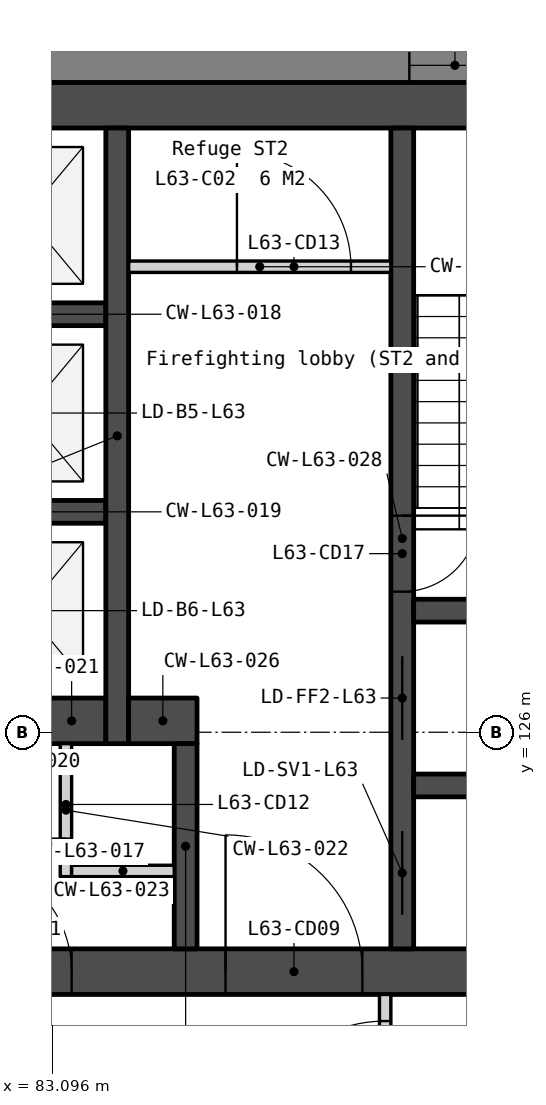
"""IFC4 building model, lengths in metres.
Left out: names, types, materials, properties, quantities, classifications, styles, units other than length and angle.
Written with IfcOpenShell. Run it as: python <this file> out.ifc"""

import sys

from ifc_helpers import new_model, si_unit, direction, frame, frame_2d, origin, place, context, subcontext, project, spatial, polyline, rectangle, outline, extrude, element, fill, save


model = new_model("IFC4")
c1 = context("Model", 3, precision=1e-05, world=origin(), true_north=direction((0.0, 1.0)))
c2 = subcontext(c1, "Body", "Model", "MODEL_VIEW")
j1 = project(units=[si_unit("LENGTHUNIT", "METRE"), si_unit("PLANEANGLEUNIT", "RADIAN")], contexts=[c1])
p1 = place(None, origin())
s1 = spatial("IfcSite", under=j1, at=p1, CompositionType="ELEMENT")
p2 = place(p1, origin())
s2 = spatial("IfcBuilding", under=s1, at=p2, CompositionType="ELEMENT")
p3 = place(p2, frame((0.0, 0.0, 258.2)))
s3 = spatial("IfcBuildingStorey", under=s2, at=p3, CompositionType="ELEMENT", Elevation=258.2)
p4 = place(p3, frame((69.0, 134.25, 0.0), z_axis=(0.0, 0.0, 1.0), x_axis=(1.0, 0.0, 0.0)))
e1 = element("IfcWall", 1, at=p4, inside=s3, PredefinedType="SOLIDWALL", context=c2, shape_type="SweptSolid", body=[
    extrude(rectangle(XDim=22.0, YDim=0.6, at=frame_2d((11.0, 0.0))), origin(), (0.0, 0.0, 1.0), 3.75),
])
p5 = place(p3, frame((69.0, 122.85, 0.0), z_axis=(0.0, 0.0, 1.0), x_axis=(1.0, 0.0, 0.0)))
e2 = element("IfcWall", 2, at=p5, inside=s3, PredefinedType="SOLIDWALL", context=c2, shape_type="SweptSolid", body=[
    extrude(rectangle(XDim=22.0, YDim=0.6, at=frame_2d((11.0, 0.0))), origin(), (0.0, 0.0, 1.0), 3.75),
])
p6 = place(p5, frame((16.375, 0.0, 0.0)))
e3 = element("IfcOpeningElement", 3, at=p6, cuts=e2, PredefinedType="OPENING", context=c2, shape_type="SweptSolid", body=[
    extrude(rectangle(XDim=1.8, YDim=2.1, at=frame_2d((0.9, 1.05))), frame((0.0, 0.31, 0.0), z_axis=(0.0, -1.0, 0.0), x_axis=(1.0, 0.0, 0.0)), (0.0, 0.0, 1.0), 0.62),
])
p7 = place(p5, frame((3.825, 0.0, 0.0)))
e4 = element("IfcOpeningElement", 4, at=p7, cuts=e2, PredefinedType="OPENING", context=c2, shape_type="SweptSolid", body=[
    extrude(rectangle(XDim=1.8, YDim=2.1, at=frame_2d((0.9, 1.05))), frame((0.0, 0.31, 0.0), z_axis=(0.0, -1.0, 0.0), x_axis=(1.0, 0.0, 0.0)), (0.0, 0.0, 1.0), 0.62),
])
p8 = place(p5, frame((12.85, 0.0, 0.0)))
e5 = element("IfcOpeningElement", 5, at=p8, cuts=e2, PredefinedType="OPENING", context=c2, shape_type="SweptSolid", body=[
    extrude(rectangle(XDim=1.5, YDim=2.1, at=frame_2d((0.75, 1.05))), frame((0.0, 0.31, 0.0), z_axis=(0.0, -1.0, 0.0), x_axis=(1.0, 0.0, 0.0)), (0.0, 0.0, 1.0), 0.62),
])
for number, where, z_axis, x_axis in (
    (6, (81.7, 131.5, 0.0), (0.0, 0.0, 1.0), (1.0, 0.0, 0.0)),
    (7, (81.7, 128.9, 0.0), (0.0, 0.0, 1.0), (1.0, 0.0, 0.0)),
):
    element("IfcWall", number, at=place(p3, frame(where, z_axis=z_axis, x_axis=x_axis)), inside=s3, PredefinedType="SOLIDWALL", context=c2, shape_type="SweptSolid", body=[
        extrude(rectangle(XDim=2.1, YDim=0.3, at=frame_2d((1.05, 0.0))), origin(), (0.0, 0.0, 1.0), 3.75),
    ])
p9 = place(p3, frame((82.9, 126.15, 0.0), z_axis=(0.0, 0.0, 1.0), x_axis=(1.0, 0.0, 0.0)))
e8 = element("IfcWall", 8, at=p9, inside=s3, PredefinedType="SOLIDWALL", context=c2, shape_type="SweptSolid", body=[
    extrude(rectangle(XDim=0.9, YDim=0.6, at=frame_2d((0.45, 0.0))), origin(), (0.0, 0.0, 1.0), 3.75),
])
p10 = place(p3, frame((83.275, 125.85, 0.0), z_axis=(0.0, 0.0, 1.0), x_axis=(0.0, -1.0, 0.0)))
e9 = element("IfcWall", 9, at=p10, inside=s3, PredefinedType="PARTITIONING", context=c2, shape_type="SweptSolid", body=[
    extrude(rectangle(XDim=1.75, YDim=0.15, at=frame_2d((0.875, 0.0))), origin(), (0.0, 0.0, 1.0), 3.75),
])
p11 = place(p10, frame((0.35, 0.0, 0.0)))
e10 = element("IfcOpeningElement", 10, at=p11, cuts=e9, PredefinedType="OPENING", context=c2, shape_type="SweptSolid", body=[
    extrude(rectangle(XDim=0.9, YDim=2.1, at=frame_2d((0.45, 1.05))), frame((0.0, 0.085, 0.0), z_axis=(0.0, -1.0, 0.0), x_axis=(1.0, 0.0, 0.0)), (0.0, 0.0, 1.0), 0.17),
])
p12 = place(p3, frame((83.35, 124.175, 0.0), z_axis=(0.0, 0.0, 1.0), x_axis=(1.0, 0.0, 0.0)))
e11 = element("IfcWall", 11, at=p12, inside=s3, PredefinedType="PARTITIONING", context=c2, shape_type="SweptSolid", body=[
    extrude(rectangle(XDim=1.35, YDim=0.15, at=frame_2d((0.675, 0.0))), origin(), (0.0, 0.0, 1.0), 3.75),
])
p13 = place(p3, frame((83.95, 133.95, 0.0), z_axis=(0.0, 0.0, 1.0), x_axis=(0.0, -1.0, 0.0)))
e12 = element("IfcWall", 12, at=p13, inside=s3, PredefinedType="SOLIDWALL", context=c2, shape_type="SweptSolid", body=[
    extrude(rectangle(XDim=8.1, YDim=0.3, at=frame_2d((4.05, 0.0))), origin(), (0.0, 0.0, 1.0), 3.75),
])
p14 = place(p3, frame((84.1, 132.125, 0.0), z_axis=(0.0, 0.0, 1.0), x_axis=(1.0, 0.0, 0.0)))
e13 = element("IfcWall", 13, at=p14, inside=s3, PredefinedType="PARTITIONING", context=c2, shape_type="SweptSolid", body=[
    extrude(rectangle(XDim=3.45, YDim=0.15, at=frame_2d((1.725, 0.0))), origin(), (0.0, 0.0, 1.0), 3.75),
])
p15 = place(p14, frame((1.425, 0.0, 0.0)))
e14 = element("IfcOpeningElement", 14, at=p15, cuts=e13, PredefinedType="OPENING", context=c2, shape_type="SweptSolid", body=[
    extrude(rectangle(XDim=1.5, YDim=2.1, at=frame_2d((0.75, 1.05))), frame((0.0, 0.085, 0.0), z_axis=(0.0, -1.0, 0.0), x_axis=(1.0, 0.0, 0.0)), (0.0, 0.0, 1.0), 0.17),
])
p16 = place(p3, frame((84.1, 126.15, 0.0), z_axis=(0.0, 0.0, 1.0), x_axis=(1.0, 0.0, 0.0)))
e15 = element("IfcWall", 15, at=p16, inside=s3, PredefinedType="SOLIDWALL", context=c2, shape_type="SweptSolid", body=[
    extrude(rectangle(XDim=0.9, YDim=0.6, at=frame_2d((0.45, 0.0))), origin(), (0.0, 0.0, 1.0), 3.75),
])
p17 = place(p3, frame((84.85, 125.85, 0.0), z_axis=(0.0, 0.0, 1.0), x_axis=(0.0, -1.0, 0.0)))
e16 = element("IfcWall", 16, at=p17, inside=s3, PredefinedType="SOLIDWALL", context=c2, shape_type="SweptSolid", body=[
    extrude(rectangle(XDim=2.7, YDim=0.3, at=frame_2d((1.35, 0.0))), origin(), (0.0, 0.0, 1.0), 3.75),
])
p18 = place(p3, frame((87.7, 133.95, 0.0), z_axis=(0.0, 0.0, 1.0), x_axis=(0.0, -1.0, 0.0)))
e17 = element("IfcWall", 17, at=p18, inside=s3, PredefinedType="SOLIDWALL", context=c2, shape_type="SweptSolid", body=[
    extrude(rectangle(XDim=10.8, YDim=0.3, at=frame_2d((5.4, 0.0))), origin(), (0.0, 0.0, 1.0), 3.75),
])
p19 = place(p18, frame((6.95, 0.0, 0.0)))
e18 = element("IfcOpeningElement", 18, at=p19, cuts=e17, PredefinedType="OPENING", context=c2, shape_type="SweptSolid", body=[
    extrude(rectangle(XDim=1.1, YDim=2.1, at=frame_2d((0.55, 1.05))), frame((0.0, 0.16, 0.0), z_axis=(0.0, -1.0, 0.0), x_axis=(1.0, 0.0, 0.0)), (0.0, 0.0, 1.0), 0.32),
])
p20 = place(p18, frame((5.1, 0.0, 0.0)))
e19 = element("IfcOpeningElement", 19, at=p20, cuts=e17, PredefinedType="OPENING", context=c2, shape_type="SweptSolid", body=[
    extrude(rectangle(XDim=1.0, YDim=2.1, at=frame_2d((0.5, 1.05))), frame((0.0, 0.16, 0.0), z_axis=(0.0, -1.0, 0.0), x_axis=(1.0, 0.0, 0.0)), (0.0, 0.0, 1.0), 0.32),
])
p21 = place(p18, frame((9.25, 0.0, 0.0)))
e20 = element("IfcOpeningElement", 20, at=p21, cuts=e17, PredefinedType="OPENING", context=c2, shape_type="SweptSolid", body=[
    extrude(rectangle(XDim=1.1, YDim=2.1, at=frame_2d((0.55, 1.05))), frame((0.0, 0.16, 0.0), z_axis=(0.0, -1.0, 0.0), x_axis=(1.0, 0.0, 0.0)), (0.0, 0.0, 1.0), 0.32),
])
for number, where, z_axis, x_axis in (
    (21, (87.85, 127.6, 0.0), (0.0, 0.0, 1.0), (1.0, 0.0, 0.0)),
    (22, (87.85, 125.3, 0.0), (0.0, 0.0, 1.0), (1.0, 0.0, 0.0)),
):
    element("IfcWall", number, at=place(p3, frame(where, z_axis=z_axis, x_axis=x_axis)), inside=s3, PredefinedType="SOLIDWALL", context=c2, shape_type="SweptSolid", body=[
        extrude(rectangle(XDim=2.55, YDim=0.3, at=frame_2d((1.275, 0.0))), origin(), (0.0, 0.0, 1.0), 3.75),
    ])
p22 = place(p3, frame((98.486, 134.775, -0.15), z_axis=(0.0, 0.0, 1.0), x_axis=(-1.0, 0.0, 0.0)))
e23 = element("IfcWall", 23, at=p22, inside=s3, PredefinedType="SOLIDWALL", context=c2, shape_type="SweptSolid", body=[
    extrude(outline(polyline([(36.972, 0.0), (36.972, 3.9), (0.0, 3.9), (0.0, 0.0), (36.972, 0.0)])), frame((0.0, 0.225, 0.0), z_axis=(0.0, -1.0, 0.0), x_axis=(1.0, 0.0, 0.0)), (0.0, 0.0, 1.0), 0.45),
])
p23 = place(p22, frame((0.715, 0.0, 0.95)))
e24 = element("IfcOpeningElement", 24, at=p23, cuts=e23, PredefinedType="OPENING", context=c2, shape_type="SweptSolid", body=[
    extrude(rectangle(XDim=1.2, YDim=2.2, at=frame_2d((0.6, 1.1))), frame((0.0, 0.235, 0.0), z_axis=(0.0, -1.0, 0.0), x_axis=(1.0, 0.0, 0.0)), (0.0, 0.0, 1.0), 0.47),
])
p24 = place(p22, frame((7.793, 0.0, 0.95)))
e25 = element("IfcOpeningElement", 25, at=p24, cuts=e23, PredefinedType="OPENING", context=c2, shape_type="SweptSolid", body=[
    extrude(rectangle(XDim=1.2, YDim=2.2, at=frame_2d((0.6, 1.1))), frame((0.0, 0.235, 0.0), z_axis=(0.0, -1.0, 0.0), x_axis=(1.0, 0.0, 0.0)), (0.0, 0.0, 1.0), 0.47),
])
p25 = place(p22, frame((9.493, 0.0, 0.95)))
e26 = element("IfcOpeningElement", 26, at=p25, cuts=e23, PredefinedType="OPENING", context=c2, shape_type="SweptSolid", body=[
    extrude(rectangle(XDim=1.2, YDim=2.2, at=frame_2d((0.6, 1.1))), frame((0.0, 0.235, 0.0), z_axis=(0.0, -1.0, 0.0), x_axis=(1.0, 0.0, 0.0)), (0.0, 0.0, 1.0), 0.47),
])
p26 = place(p22, frame((17.036, 0.0, 0.95)))
e27 = element("IfcOpeningElement", 27, at=p26, cuts=e23, PredefinedType="OPENING", context=c2, shape_type="SweptSolid", body=[
    extrude(rectangle(XDim=1.2, YDim=2.2, at=frame_2d((0.6, 1.1))), frame((0.0, 0.235, 0.0), z_axis=(0.0, -1.0, 0.0), x_axis=(1.0, 0.0, 0.0)), (0.0, 0.0, 1.0), 0.47),
])
p27 = place(p22, frame((18.736, 0.0, 0.95)))
e28 = element("IfcOpeningElement", 28, at=p27, cuts=e23, PredefinedType="OPENING", context=c2, shape_type="SweptSolid", body=[
    extrude(rectangle(XDim=1.2, YDim=2.2, at=frame_2d((0.6, 1.1))), frame((0.0, 0.235, 0.0), z_axis=(0.0, -1.0, 0.0), x_axis=(1.0, 0.0, 0.0)), (0.0, 0.0, 1.0), 0.47),
])
p28 = place(p22, frame((26.279, 0.0, 0.95)))
e29 = element("IfcOpeningElement", 29, at=p28, cuts=e23, PredefinedType="OPENING", context=c2, shape_type="SweptSolid", body=[
    extrude(rectangle(XDim=1.2, YDim=2.2, at=frame_2d((0.6, 1.1))), frame((0.0, 0.235, 0.0), z_axis=(0.0, -1.0, 0.0), x_axis=(1.0, 0.0, 0.0)), (0.0, 0.0, 1.0), 0.47),
])
p29 = place(p22, frame((27.979, 0.0, 0.95)))
e30 = element("IfcOpeningElement", 30, at=p29, cuts=e23, PredefinedType="OPENING", context=c2, shape_type="SweptSolid", body=[
    extrude(rectangle(XDim=1.2, YDim=2.2, at=frame_2d((0.6, 1.1))), frame((0.0, 0.235, 0.0), z_axis=(0.0, -1.0, 0.0), x_axis=(1.0, 0.0, 0.0)), (0.0, 0.0, 1.0), 0.47),
])
p30 = place(p22, frame((35.058, 0.0, 0.95)))
e31 = element("IfcOpeningElement", 31, at=p30, cuts=e23, PredefinedType="OPENING", context=c2, shape_type="SweptSolid", body=[
    extrude(rectangle(XDim=1.2, YDim=2.2, at=frame_2d((0.6, 1.1))), frame((0.0, 0.235, 0.0), z_axis=(0.0, -1.0, 0.0), x_axis=(1.0, 0.0, 0.0)), (0.0, 0.0, 1.0), 0.47),
])
p31 = place(p3, frame((80.905, 101.188, -0.15), z_axis=(0.0, 0.0, 1.0), x_axis=(0.500002536638, 0.866023939251, 0.0)))
e32 = element("IfcWall", 32, at=p31, inside=s3, PredefinedType="SOLIDWALL", context=c2, shape_type="SweptSolid", body=[
    extrude(outline(polyline([(36.972, 0.0), (36.972, 3.9), (0.0, 3.9), (0.0, 0.0), (36.972, 0.0)])), frame((0.0, 0.225, 0.0), z_axis=(0.0, -1.0, 0.0), x_axis=(1.0, 0.0, 0.0)), (0.0, 0.0, 1.0), 0.45),
])
p32 = place(p31, frame((0.715, 0.0, 0.95)))
e33 = element("IfcOpeningElement", 33, at=p32, cuts=e32, PredefinedType="OPENING", context=c2, shape_type="SweptSolid", body=[
    extrude(rectangle(XDim=1.2, YDim=2.2, at=frame_2d((0.6, 1.1))), frame((0.0, 0.235, 0.0), z_axis=(0.0, -1.0, 0.0), x_axis=(1.0, 0.0, 0.0)), (0.0, 0.0, 1.0), 0.47),
])
p33 = place(p31, frame((7.793, 0.0, 0.95)))
e34 = element("IfcOpeningElement", 34, at=p33, cuts=e32, PredefinedType="OPENING", context=c2, shape_type="SweptSolid", body=[
    extrude(rectangle(XDim=1.2, YDim=2.2, at=frame_2d((0.6, 1.1))), frame((0.0, 0.235, 0.0), z_axis=(0.0, -1.0, 0.0), x_axis=(1.0, 0.0, 0.0)), (0.0, 0.0, 1.0), 0.47),
])
p34 = place(p31, frame((9.493, 0.0, 0.95)))
e35 = element("IfcOpeningElement", 35, at=p34, cuts=e32, PredefinedType="OPENING", context=c2, shape_type="SweptSolid", body=[
    extrude(rectangle(XDim=1.2, YDim=2.2, at=frame_2d((0.6, 1.1))), frame((0.0, 0.235, 0.0), z_axis=(0.0, -1.0, 0.0), x_axis=(1.0, 0.0, 0.0)), (0.0, 0.0, 1.0), 0.47),
])
p35 = place(p31, frame((17.036, 0.0, 0.95)))
e36 = element("IfcOpeningElement", 36, at=p35, cuts=e32, PredefinedType="OPENING", context=c2, shape_type="SweptSolid", body=[
    extrude(rectangle(XDim=1.2, YDim=2.2, at=frame_2d((0.6, 1.1))), frame((0.0, 0.235, 0.0), z_axis=(0.0, -1.0, 0.0), x_axis=(1.0, 0.0, 0.0)), (0.0, 0.0, 1.0), 0.47),
])
p36 = place(p31, frame((18.736, 0.0, 0.95)))
e37 = element("IfcOpeningElement", 37, at=p36, cuts=e32, PredefinedType="OPENING", context=c2, shape_type="SweptSolid", body=[
    extrude(rectangle(XDim=1.2, YDim=2.2, at=frame_2d((0.6, 1.1))), frame((0.0, 0.235, 0.0), z_axis=(0.0, -1.0, 0.0), x_axis=(1.0, 0.0, 0.0)), (0.0, 0.0, 1.0), 0.47),
])
p37 = place(p31, frame((26.279, 0.0, 0.95)))
e38 = element("IfcOpeningElement", 38, at=p37, cuts=e32, PredefinedType="OPENING", context=c2, shape_type="SweptSolid", body=[
    extrude(rectangle(XDim=1.2, YDim=2.2, at=frame_2d((0.6, 1.1))), frame((0.0, 0.235, 0.0), z_axis=(0.0, -1.0, 0.0), x_axis=(1.0, 0.0, 0.0)), (0.0, 0.0, 1.0), 0.47),
])
p38 = place(p31, frame((27.979, 0.0, 0.95)))
e39 = element("IfcOpeningElement", 39, at=p38, cuts=e32, PredefinedType="OPENING", context=c2, shape_type="SweptSolid", body=[
    extrude(rectangle(XDim=1.2, YDim=2.2, at=frame_2d((0.6, 1.1))), frame((0.0, 0.235, 0.0), z_axis=(0.0, -1.0, 0.0), x_axis=(1.0, 0.0, 0.0)), (0.0, 0.0, 1.0), 0.47),
])
p39 = place(p31, frame((35.058, 0.0, 0.95)))
e40 = element("IfcOpeningElement", 40, at=p39, cuts=e32, PredefinedType="OPENING", context=c2, shape_type="SweptSolid", body=[
    extrude(rectangle(XDim=1.2, YDim=2.2, at=frame_2d((0.6, 1.1))), frame((0.0, 0.235, 0.0), z_axis=(0.0, -1.0, 0.0), x_axis=(1.0, 0.0, 0.0)), (0.0, 0.0, 1.0), 0.47),
])
p40 = place(p3, frame((87.475, 120.05, 0.0), z_axis=(0.0, 0.0, 1.0), x_axis=(0.0, 1.0, 0.0)))
e41 = element("IfcWall", 41, at=p40, inside=s3, PredefinedType="PARTITIONING", context=c2, shape_type="SweptSolid", body=[
    extrude(rectangle(XDim=2.5, YDim=0.15, at=frame_2d((1.25, 0.0))), origin(), (0.0, 0.0, 1.0), 3.75),
])
p41 = place(p40, frame((0.35, 0.0, 0.0)))
e42 = element("IfcOpeningElement", 42, at=p41, cuts=e41, PredefinedType="OPENING", context=c2, shape_type="SweptSolid", body=[
    extrude(rectangle(XDim=1.8, YDim=2.1, at=frame_2d((0.9, 1.05))), frame((0.0, 0.085, 0.0), z_axis=(0.0, -1.0, 0.0), x_axis=(1.0, 0.0, 0.0)), (0.0, 0.0, 1.0), 0.17),
])
p42 = place(p19, origin())
e43 = element("IfcDoor", 43, at=p42, inside=s3, OperationType="SLIDING_TO_LEFT", PredefinedType="DOOR", context=c2, shape_type="SweptSolid", body=[
    extrude(rectangle(XDim=1.1, YDim=2.1, at=frame_2d((0.55, 1.05))), frame((0.0, 0.025, 0.0), z_axis=(0.0, -1.0, 0.0), x_axis=(1.0, 0.0, 0.0)), (0.0, 0.0, 1.0), 0.05),
])
fill(e18, e43)
p43 = place(p6, origin())
e44 = element("IfcDoor", 44, at=p43, inside=s3, OperationType="DOUBLE_DOOR_DOUBLE_SWING", PredefinedType="DOOR", context=c2, shape_type="SweptSolid", body=[
    extrude(rectangle(XDim=1.8, YDim=2.1, at=frame_2d((0.9, 1.05))), frame((0.0, 0.025, 0.0), z_axis=(0.0, -1.0, 0.0), x_axis=(1.0, 0.0, 0.0)), (0.0, 0.0, 1.0), 0.05),
])
fill(e3, e44)
p44 = place(p8, origin())
e45 = element("IfcDoor", 45, at=p44, inside=s3, OperationType="DOUBLE_DOOR_DOUBLE_SWING", PredefinedType="DOOR", context=c2, shape_type="SweptSolid", body=[
    extrude(rectangle(XDim=1.5, YDim=2.1, at=frame_2d((0.75, 1.05))), frame((0.0, 0.025, 0.0), z_axis=(0.0, -1.0, 0.0), x_axis=(1.0, 0.0, 0.0)), (0.0, 0.0, 1.0), 0.05),
])
fill(e5, e45)
p45 = place(p11, origin())
e46 = element("IfcDoor", 46, at=p45, inside=s3, OperationType="SINGLE_SWING_RIGHT", PredefinedType="DOOR", context=c2, shape_type="SweptSolid", body=[
    extrude(rectangle(XDim=0.9, YDim=2.1, at=frame_2d((0.45, 1.05))), frame((0.0, 0.025, 0.0), z_axis=(0.0, -1.0, 0.0), x_axis=(1.0, 0.0, 0.0)), (0.0, 0.0, 1.0), 0.05),
])
fill(e10, e46)
p46 = place(p15, origin())
e47 = element("IfcDoor", 47, at=p46, inside=s3, OperationType="DOUBLE_DOOR_DOUBLE_SWING", PredefinedType="DOOR", context=c2, shape_type="SweptSolid", body=[
    extrude(rectangle(XDim=1.5, YDim=2.1, at=frame_2d((0.75, 1.05))), frame((0.0, 0.025, 0.0), z_axis=(0.0, -1.0, 0.0), x_axis=(1.0, 0.0, 0.0)), (0.0, 0.0, 1.0), 0.05),
])
fill(e14, e47)
p47 = place(p20, origin())
e48 = element("IfcDoor", 48, at=p47, inside=s3, OperationType="SINGLE_SWING_LEFT", PredefinedType="DOOR", context=c2, shape_type="SweptSolid", body=[
    extrude(rectangle(XDim=1.0, YDim=2.1, at=frame_2d((0.5, 1.05))), frame((0.0, 0.025, 0.0), z_axis=(0.0, -1.0, 0.0), x_axis=(1.0, 0.0, 0.0)), (0.0, 0.0, 1.0), 0.05),
])
fill(e19, e48)
p48 = place(p21, origin())
e49 = element("IfcDoor", 49, at=p48, inside=s3, OperationType="SLIDING_TO_LEFT", PredefinedType="DOOR", context=c2, shape_type="SweptSolid", body=[
    extrude(rectangle(XDim=1.1, YDim=2.1, at=frame_2d((0.55, 1.05))), frame((0.0, 0.025, 0.0), z_axis=(0.0, -1.0, 0.0), x_axis=(1.0, 0.0, 0.0)), (0.0, 0.0, 1.0), 0.05),
])
fill(e20, e49)
p49 = place(p25, origin())
e50 = element("IfcWindow", 50, at=p49, inside=s3, PartitioningType="SINGLE_PANEL", PredefinedType="WINDOW", context=c2, shape_type="SweptSolid", body=[
    extrude(rectangle(XDim=1.2, YDim=2.2, at=frame_2d((0.6, 1.1))), frame((0.0, 0.03, 0.0), z_axis=(0.0, -1.0, 0.0), x_axis=(1.0, 0.0, 0.0)), (0.0, 0.0, 1.0), 0.06),
])
fill(e26, e50)
p50 = place(p41, origin())
e51 = element("IfcDoor", 51, at=p50, inside=s3, OperationType="SINGLE_SWING_LEFT", PredefinedType="DOOR", context=c2, shape_type="SweptSolid", body=[
    extrude(rectangle(XDim=1.8, YDim=2.1, at=frame_2d((0.9, 1.05))), frame((0.0, 0.025, 0.0), z_axis=(0.0, -1.0, 0.0), x_axis=(1.0, 0.0, 0.0)), (0.0, 0.0, 1.0), 0.05),
])
fill(e42, e51)
save(model, sys.argv[1])
